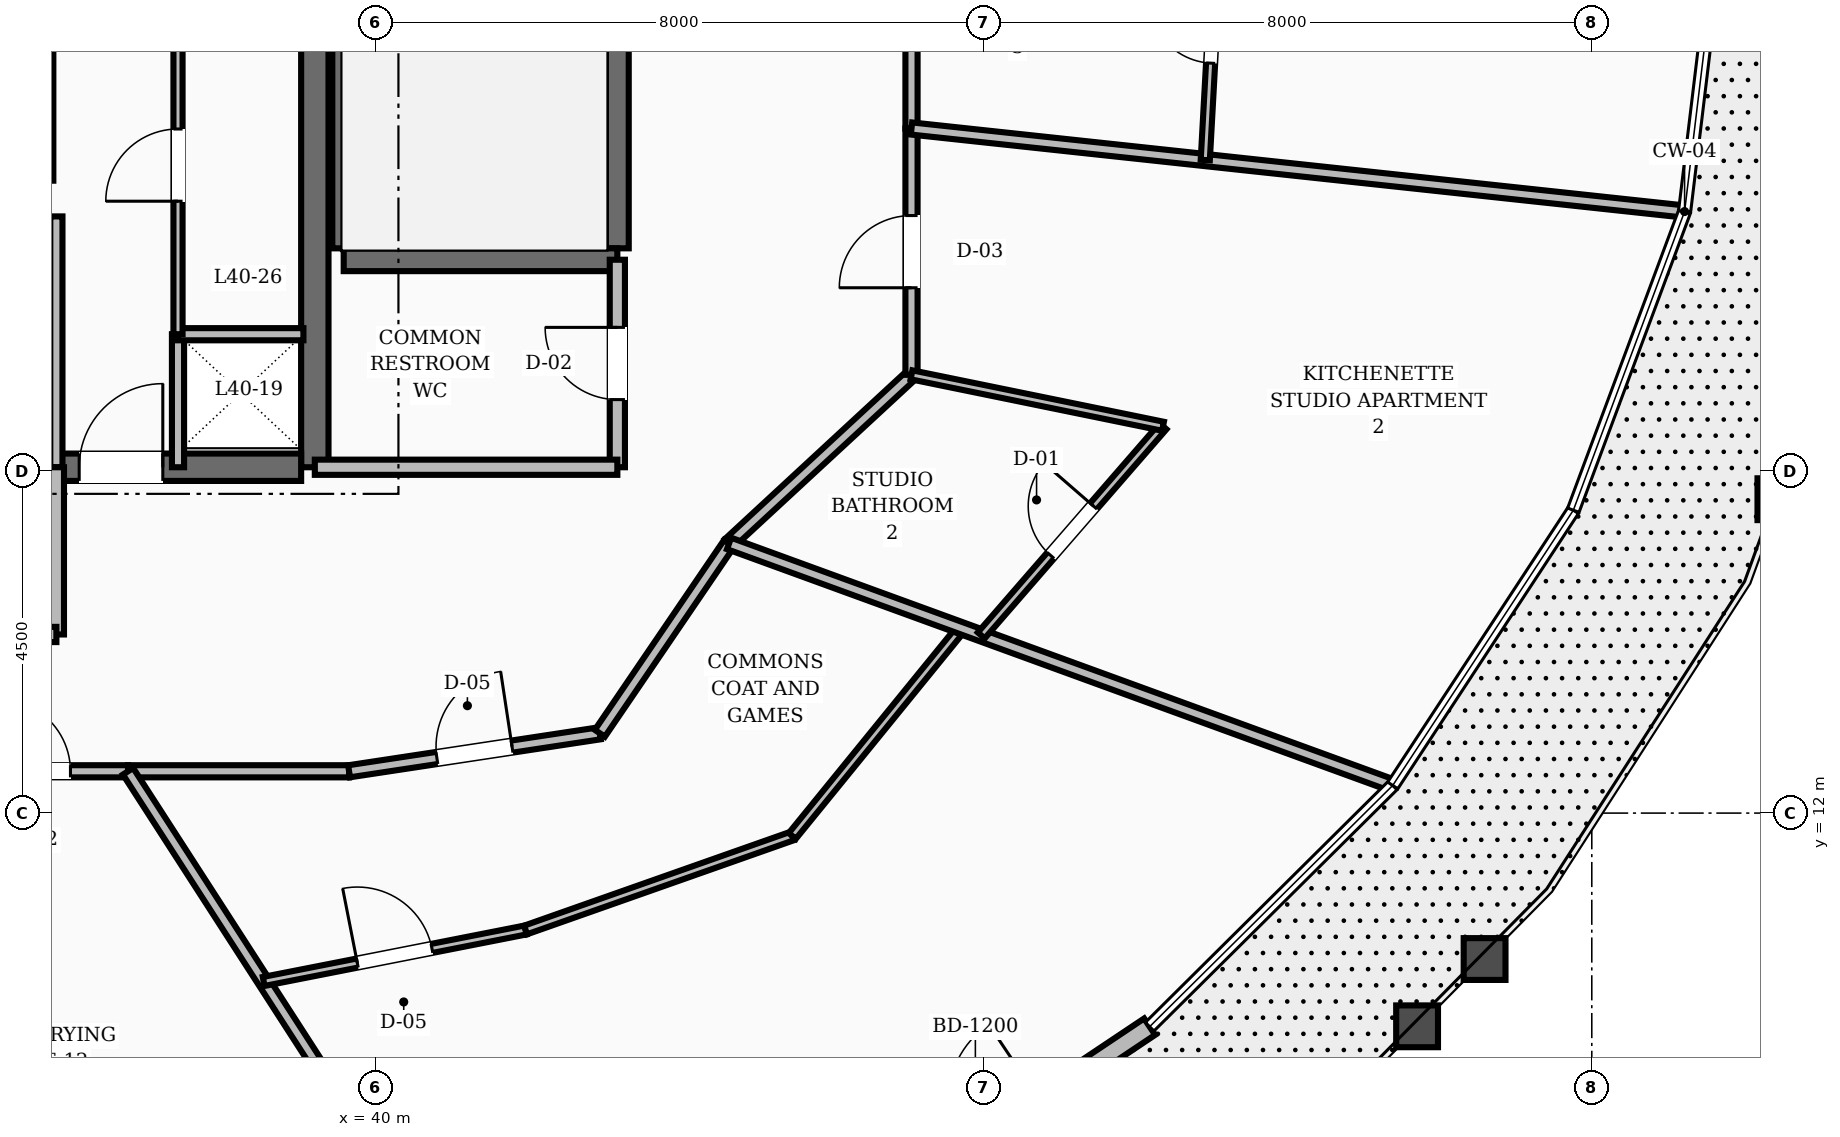
"""IFC4 building model, lengths in metres.
Left out: names, types, materials, properties, quantities, classifications, styles, units other than length and angle.
Written with IfcOpenShell. Run it as: python <this file> out.ifc"""

import sys

from ifc_helpers import new_model, si_unit, direction, frame, frame_2d, origin, place, context, subcontext, project, spatial, rectangle, extrude, element, fill, save


model = new_model("IFC4")
c1 = context("Model", 3, precision=1e-05, world=origin(), true_north=direction((0.0, 1.0)))
c2 = subcontext(c1, "Body", "Model", "MODEL_VIEW")
j1 = project(units=[si_unit("LENGTHUNIT", "METRE"), si_unit("PLANEANGLEUNIT", "RADIAN")], contexts=[c1])
p1 = place(None, origin())
s1 = spatial("IfcSite", under=j1, at=p1, CompositionType="ELEMENT")
p2 = place(p1, origin())
s2 = spatial("IfcBuilding", under=s1, at=p2, CompositionType="ELEMENT")
p3 = place(p2, frame((0.0, 0.0, 156.8)))
s3 = spatial("IfcBuildingStorey", under=s2, at=p3, CompositionType="ELEMENT", Elevation=156.8)
p4 = place(p3, frame((39.2, 16.55, 0.0), z_axis=(0.0, 0.0, 1.0), x_axis=(0.0, 1.0, 0.0)))
e1 = element("IfcWall", 1, at=p4, inside=s3, PredefinedType="SHEAR", context=c2, shape_type="SweptSolid", body=[
    extrude(rectangle(XDim=6.3, YDim=0.36, at=frame_2d((3.15, 0.0))), origin(), (0.0, 0.0, 1.0), 3.6),
])
p5 = place(p3, frame((35.8, 16.55, 0.0), z_axis=(0.0, 0.0, 1.0), x_axis=(1.0, 0.0, 0.0)))
e2 = element("IfcWall", 2, at=p5, inside=s3, PredefinedType="SHEAR", context=c2, shape_type="SweptSolid", body=[
    extrude(rectangle(XDim=3.22, YDim=0.36, at=frame_2d((1.61, 0.0))), origin(), (0.0, 0.0, 1.0), 3.6),
])
p6 = place(p5, frame((0.3, 0.0, 0.0)))
e3 = element("IfcOpeningElement", 3, at=p6, cuts=e2, PredefinedType="OPENING", context=c2, shape_type="SweptSolid", body=[
    extrude(rectangle(XDim=1.1, YDim=2.1, at=frame_2d((0.55, 1.05))), frame((0.0, 0.19, 0.0), z_axis=(0.0, -1.0, 0.0), x_axis=(1.0, 0.0, 0.0)), (0.0, 0.0, 1.0), 0.38),
])
for number, where, z_axis, x_axis in (
    (4, (43.18, 19.43, 0.0), (0.0, 0.0, 1.0), (0.0, 1.0, 0.0)),
    (5, (39.58, 19.43, 0.0), (0.0, 0.0, 1.0), (0.0, 1.0, 0.0)),
):
    element("IfcWall", number, at=place(p3, frame(where, z_axis=z_axis, x_axis=x_axis)), inside=s3, PredefinedType="SHEAR", context=c2, shape_type="SweptSolid", body=[
        extrude(rectangle(XDim=8.74, YDim=0.3, at=frame_2d((4.37, 0.0))), origin(), (0.0, 0.0, 1.0), 3.6),
    ])
p7 = place(p3, frame((39.58, 19.28, 0.0), z_axis=(0.0, 0.0, 1.0), x_axis=(1.0, 0.0, 0.0)))
e6 = element("IfcWall", 6, at=p7, inside=s3, PredefinedType="SHEAR", context=c2, shape_type="SweptSolid", body=[
    extrude(rectangle(XDim=3.6, YDim=0.3, at=frame_2d((1.8, 0.0))), origin(), (0.0, 0.0, 1.0), 3.6),
])
p8 = place(p3, frame((46.286, 6.585, 0.0), z_axis=(0.0, 0.0, 1.0), x_axis=(0.831368522851, 0.555721494286, 0.0)))
e7 = element("IfcWall", 7, at=p8, inside=s3, PredefinedType="STANDARD", context=c2, shape_type="SweptSolid", body=[
    extrude(rectangle(XDim=4.687, YDim=0.26, at=frame_2d((2.344, 0.0))), origin(), (0.0, 0.0, 1.0), 2.82),
])
p9 = place(p8, frame((1.744, 0.0, 0.0)))
e8 = element("IfcOpeningElement", 8, at=p9, cuts=e7, PredefinedType="OPENING", context=c2, shape_type="SweptSolid", body=[
    extrude(rectangle(XDim=1.2, YDim=2.15, at=frame_2d((0.6, 1.075))), frame((0.0, 0.14, 0.0), z_axis=(0.0, -1.0, 0.0), x_axis=(1.0, 0.0, 0.0)), (0.0, 0.0, 1.0), 0.28),
])
p10 = place(p3, frame((43.18, 16.55, 0.0), z_axis=(0.0, 0.0, 1.0), x_axis=(0.0, 1.0, 0.0)))
e9 = element("IfcWall", 9, at=p10, inside=s3, PredefinedType="SOLIDWALL", context=c2, shape_type="SweptSolid", body=[
    extrude(rectangle(XDim=2.73, YDim=0.2, at=frame_2d((1.365, 0.0))), origin(), (0.0, 0.0, 1.0), 2.8),
])
p11 = place(p10, frame((0.89, 0.0, 0.0)))
e10 = element("IfcOpeningElement", 10, at=p11, cuts=e9, PredefinedType="OPENING", context=c2, shape_type="SweptSolid", body=[
    extrude(rectangle(XDim=0.95, YDim=2.1, at=frame_2d((0.475, 1.05))), frame((0.0, 0.11, 0.0), z_axis=(0.0, -1.0, 0.0), x_axis=(1.0, 0.0, 0.0)), (0.0, 0.0, 1.0), 0.22),
])
p12 = place(p3, frame((39.2, 16.55, 0.0), z_axis=(0.0, 0.0, 1.0), x_axis=(1.0, 0.0, 0.0)))
e11 = element("IfcWall", 11, at=p12, inside=s3, PredefinedType="SOLIDWALL", context=c2, shape_type="SweptSolid", body=[
    extrude(rectangle(XDim=3.98, YDim=0.2, at=frame_2d((1.99, 0.0))), origin(), (0.0, 0.0, 1.0), 2.8),
])
p13 = place(p3, frame((35.8, 16.55, 0.0), z_axis=(0.0, 0.0, 1.0), x_axis=(0.0, 1.0, 0.0)))
e12 = element("IfcWall", 12, at=p13, inside=s3, PredefinedType="SOLIDWALL", context=c2, shape_type="SweptSolid", body=[
    extrude(rectangle(XDim=3.3, YDim=0.16, at=frame_2d((1.65, 0.0))), origin(), (0.0, 0.0, 1.0), 2.8),
])
p14 = place(p3, frame((37.4, 16.55, 0.0), z_axis=(0.0, 0.0, 1.0), x_axis=(0.0, 1.0, 0.0)))
e13 = element("IfcWall", 13, at=p14, inside=s3, PredefinedType="SOLIDWALL", context=c2, shape_type="SweptSolid", body=[
    extrude(rectangle(XDim=1.75, YDim=0.16, at=frame_2d((0.875, 0.0))), origin(), (0.0, 0.0, 1.0), 2.8),
])
p15 = place(p3, frame((35.8, 14.35, 0.0), z_axis=(0.0, 0.0, 1.0), x_axis=(0.0, 1.0, 0.0)))
e14 = element("IfcWall", 14, at=p15, inside=s3, PredefinedType="SOLIDWALL", context=c2, shape_type="SweptSolid", body=[
    extrude(rectangle(XDim=2.2, YDim=0.2, at=frame_2d((1.1, 0.0))), origin(), (0.0, 0.0, 1.0), 2.8),
])
p16 = place(p3, frame((28.2, 14.35, 0.0), z_axis=(0.0, 0.0, 1.0), x_axis=(1.0, 0.0, 0.0)))
e15 = element("IfcWall", 15, at=p16, inside=s3, PredefinedType="SOLIDWALL", context=c2, shape_type="SweptSolid", body=[
    extrude(rectangle(XDim=7.6, YDim=0.2, at=frame_2d((3.8, 0.0))), origin(), (0.0, 0.0, 1.0), 2.8),
])
p17 = place(p16, frame((3.2, 0.0, 0.0)))
e16 = element("IfcOpeningElement", 16, at=p17, cuts=e15, PredefinedType="OPENING", context=c2, shape_type="SweptSolid", body=[
    extrude(rectangle(XDim=1.2, YDim=2.1, at=frame_2d((0.6, 1.05))), frame((0.0, 0.11, 0.0), z_axis=(0.0, -1.0, 0.0), x_axis=(1.0, 0.0, 0.0)), (0.0, 0.0, 1.0), 0.22),
])
p18 = place(p3, frame((35.68, 20.32, 0.0), z_axis=(0.0, 0.0, 1.0), x_axis=(0.0, 1.0, 0.0)))
e17 = element("IfcWall", 17, at=p18, inside=s3, PredefinedType="SOLIDWALL", context=c2, shape_type="SweptSolid", body=[
    extrude(rectangle(XDim=2.36, YDim=0.16, at=frame_2d((1.18, 0.0))), origin(), (0.0, 0.0, 1.0), 2.8),
])
p19 = place(p3, frame((37.4, 18.3, 0.0), z_axis=(0.0, 0.0, 1.0), x_axis=(1.0, 0.0, 0.0)))
e18 = element("IfcWall", 18, at=p19, inside=s3, PredefinedType="SOLIDWALL", context=c2, shape_type="SweptSolid", body=[
    extrude(rectangle(XDim=1.65, YDim=0.16, at=frame_2d((0.825, 0.0))), origin(), (0.0, 0.0, 1.0), 2.8),
])
p20 = place(p3, frame((37.4, 18.3, 0.0), z_axis=(0.0, 0.0, 1.0), x_axis=(0.0, 1.0, 0.0)))
e19 = element("IfcWall", 19, at=p20, inside=s3, PredefinedType="PARTITIONING", context=c2, shape_type="SweptSolid", body=[
    extrude(rectangle(XDim=4.45, YDim=0.12, at=frame_2d((2.225, 0.0))), origin(), (0.0, 0.0, 1.0), 2.8),
])
p21 = place(p20, frame((1.75, 0.0, 0.0)))
e20 = element("IfcOpeningElement", 20, at=p21, cuts=e19, PredefinedType="OPENING", context=c2, shape_type="SweptSolid", body=[
    extrude(rectangle(XDim=0.95, YDim=2.1, at=frame_2d((0.475, 1.05))), frame((0.0, 0.07, 0.0), z_axis=(0.0, -1.0, 0.0), x_axis=(1.0, 0.0, 0.0)), (0.0, 0.0, 1.0), 0.14),
])
p22 = place(p3, frame((34.278, 12.55, 0.0), z_axis=(0.0, 0.0, 1.0), x_axis=(1.0, 0.0, 0.0)))
e21 = element("IfcWall", 21, at=p22, inside=s3, PredefinedType="SOLIDWALL", context=c2, shape_type="SweptSolid", body=[
    extrude(rectangle(XDim=2.465, YDim=0.16, at=frame_2d((1.232, 0.0))), origin(), (0.0, 0.0, 1.0), 2.8),
])
p23 = place(p22, frame((0.758, 0.0, 0.0)))
e22 = element("IfcOpeningElement", 22, at=p23, cuts=e21, PredefinedType="OPENING", context=c2, shape_type="SweptSolid", body=[
    extrude(rectangle(XDim=0.95, YDim=2.1, at=frame_2d((0.475, 1.05))), frame((0.0, 0.09, 0.0), z_axis=(0.0, -1.0, 0.0), x_axis=(1.0, 0.0, 0.0)), (0.0, 0.0, 1.0), 0.18),
])
p24 = place(p3, frame((36.743, 12.55, 0.0), z_axis=(0.0, 0.0, 1.0), x_axis=(1.0, 0.0, 0.0)))
e23 = element("IfcWall", 23, at=p24, inside=s3, PredefinedType="SOLIDWALL", context=c2, shape_type="SweptSolid", body=[
    extrude(rectangle(XDim=2.908, YDim=0.16, at=frame_2d((1.454, 0.0))), origin(), (0.0, 0.0, 1.0), 2.8),
])
p25 = place(p3, frame((39.651, 12.55, 0.0), z_axis=(0.0, 0.0, 1.0), x_axis=(0.988710906508, 0.149835721217, 0.0)))
e24 = element("IfcWall", 24, at=p25, inside=s3, PredefinedType="SOLIDWALL", context=c2, shape_type="SweptSolid", body=[
    extrude(rectangle(XDim=3.337, YDim=0.16, at=frame_2d((1.668, 0.0))), origin(), (0.0, 0.0, 1.0), 2.8),
])
p26 = place(p25, frame((1.168, 0.0, 0.0)))
e25 = element("IfcOpeningElement", 25, at=p26, cuts=e24, PredefinedType="OPENING", context=c2, shape_type="SweptSolid", body=[
    extrude(rectangle(XDim=1.0, YDim=2.1, at=frame_2d((0.5, 1.05))), frame((0.0, 0.09, 0.0), z_axis=(0.0, -1.0, 0.0), x_axis=(1.0, 0.0, 0.0)), (0.0, 0.0, 1.0), 0.18),
])
p27 = place(p3, frame((42.95, 13.05, 0.0), z_axis=(0.0, 0.0, 1.0), x_axis=(0.562674669208, 0.826678423955, 0.0)))
e26 = element("IfcWall", 26, at=p27, inside=s3, PredefinedType="SOLIDWALL", context=c2, shape_type="SweptSolid", body=[
    extrude(rectangle(XDim=3.021, YDim=0.16, at=frame_2d((1.511, 0.0))), origin(), (0.0, 0.0, 1.0), 2.8),
])
p28 = place(p3, frame((44.65, 15.548, 0.0), z_axis=(0.0, 0.0, 1.0), x_axis=(0.734347936521, 0.678773237633, 0.0)))
e27 = element("IfcWall", 27, at=p28, inside=s3, PredefinedType="SOLIDWALL", context=c2, shape_type="SweptSolid", body=[
    extrude(rectangle(XDim=3.268, YDim=0.16, at=frame_2d((1.634, 0.0))), origin(), (0.0, 0.0, 1.0), 2.8),
])
p29 = place(p3, frame((47.05, 17.766, 0.0), z_axis=(0.0, 0.0, 1.0), x_axis=(0.0, 1.0, 0.0)))
e28 = element("IfcWall", 28, at=p29, inside=s3, PredefinedType="SOLIDWALL", context=c2, shape_type="SweptSolid", body=[
    extrude(rectangle(XDim=3.24, YDim=0.16, at=frame_2d((1.62, 0.0))), origin(), (0.0, 0.0, 1.0), 2.8),
])
p30 = place(p29, frame((1.145, 0.0, 0.0)))
e29 = element("IfcOpeningElement", 29, at=p30, cuts=e28, PredefinedType="OPENING", context=c2, shape_type="SweptSolid", body=[
    extrude(rectangle(XDim=0.95, YDim=2.1, at=frame_2d((0.475, 1.05))), frame((0.0, 0.09, 0.0), z_axis=(0.0, -1.0, 0.0), x_axis=(1.0, 0.0, 0.0)), (0.0, 0.0, 1.0), 0.18),
])
p31 = place(p3, frame((47.05, 21.006, 0.0), z_axis=(0.0, 0.0, 1.0), x_axis=(0.0, 1.0, 0.0)))
e30 = element("IfcWall", 30, at=p31, inside=s3, PredefinedType="SOLIDWALL", context=c2, shape_type="SweptSolid", body=[
    extrude(rectangle(XDim=2.994, YDim=0.16, at=frame_2d((1.497, 0.0))), origin(), (0.0, 0.0, 1.0), 2.8),
])
p32 = place(p3, frame((36.743, 12.55, 0.0), z_axis=(0.0, 0.0, 1.0), x_axis=(0.542222596655, -0.840234881254, 0.0)))
e31 = element("IfcWall", 31, at=p32, inside=s3, PredefinedType="SOLIDWALL", context=c2, shape_type="SweptSolid", body=[
    extrude(rectangle(XDim=9.352, YDim=0.16, at=frame_2d((4.676, 0.0))), origin(), (0.0, 0.0, 1.0), 2.8),
])
p33 = place(p3, frame((38.527, 9.785, 0.0), z_axis=(0.0, 0.0, 1.0), x_axis=(0.981217112096, 0.192906658595, 0.0)))
e32 = element("IfcWall", 32, at=p33, inside=s3, PredefinedType="PARTITIONING", context=c2, shape_type="SweptSolid", body=[
    extrude(rectangle(XDim=3.512, YDim=0.12, at=frame_2d((1.756, 0.0))), origin(), (0.0, 0.0, 1.0), 2.8),
])
p34 = place(p33, frame((1.256, 0.0, 0.0)))
e33 = element("IfcOpeningElement", 33, at=p34, cuts=e32, PredefinedType="OPENING", context=c2, shape_type="SweptSolid", body=[
    extrude(rectangle(XDim=1.0, YDim=2.1, at=frame_2d((0.5, 1.05))), frame((0.0, 0.07, 0.0), z_axis=(0.0, -1.0, 0.0), x_axis=(1.0, 0.0, 0.0)), (0.0, 0.0, 1.0), 0.14),
])
p35 = place(p3, frame((41.973, 10.462, 0.0), z_axis=(0.0, 0.0, 1.0), x_axis=(0.943136844467, 0.332404712075, 0.0)))
e34 = element("IfcWall", 34, at=p35, inside=s3, PredefinedType="PARTITIONING", context=c2, shape_type="SweptSolid", body=[
    extrude(rectangle(XDim=3.72, YDim=0.12, at=frame_2d((1.86, 0.0))), origin(), (0.0, 0.0, 1.0), 2.8),
])
p36 = place(p3, frame((45.482, 11.699, 0.0), z_axis=(0.0, 0.0, 1.0), x_axis=(0.631043665678, 0.775747311957, 0.0)))
e35 = element("IfcWall", 35, at=p36, inside=s3, PredefinedType="PARTITIONING", context=c2, shape_type="SweptSolid", body=[
    extrude(rectangle(XDim=3.524, YDim=0.12, at=frame_2d((1.762, 0.0))), origin(), (0.0, 0.0, 1.0), 2.8),
])
p37 = place(p3, frame((44.65, 15.548, 0.0), z_axis=(0.0, 0.0, 1.0), x_axis=(0.939495403678, -0.342561507568, 0.0)))
e36 = element("IfcWall", 36, at=p37, inside=s3, PredefinedType="SOLIDWALL", context=c2, shape_type="SweptSolid", body=[
    extrude(rectangle(XDim=9.244, YDim=0.16, at=frame_2d((4.622, 0.0))), origin(), (0.0, 0.0, 1.0), 2.8),
])
p38 = place(p3, frame((47.968, 14.338, 0.0), z_axis=(0.0, 0.0, 1.0), x_axis=(0.655911700686, 0.754837625522, 0.0)))
e37 = element("IfcWall", 37, at=p38, inside=s3, PredefinedType="PARTITIONING", context=c2, shape_type="SweptSolid", body=[
    extrude(rectangle(XDim=3.645, YDim=0.12, at=frame_2d((1.823, 0.0))), origin(), (0.0, 0.0, 1.0), 2.8),
])
p39 = place(p38, frame((1.393, 0.0, 0.0)))
e38 = element("IfcOpeningElement", 38, at=p39, cuts=e37, PredefinedType="OPENING", context=c2, shape_type="SweptSolid", body=[
    extrude(rectangle(XDim=0.86, YDim=2.1, at=frame_2d((0.43, 1.05))), frame((0.0, 0.07, 0.0), z_axis=(0.0, -1.0, 0.0), x_axis=(1.0, 0.0, 0.0)), (0.0, 0.0, 1.0), 0.14),
])
p40 = place(p3, frame((47.05, 17.766, 0.0), z_axis=(0.0, 0.0, 1.0), x_axis=(0.979703641508, -0.200451427573, 0.0)))
e39 = element("IfcWall", 39, at=p40, inside=s3, PredefinedType="PARTITIONING", context=c2, shape_type="SweptSolid", body=[
    extrude(rectangle(XDim=3.377, YDim=0.12, at=frame_2d((1.689, 0.0))), origin(), (0.0, 0.0, 1.0), 2.8),
])
p41 = place(p3, frame((47.05, 21.006, 0.0), z_axis=(0.0, 0.0, 1.0), x_axis=(0.994280445997, -0.106800724287, 0.0)))
e40 = element("IfcWall", 40, at=p41, inside=s3, PredefinedType="SOLIDWALL", context=c2, shape_type="SweptSolid", body=[
    extrude(rectangle(XDim=10.179, YDim=0.16, at=frame_2d((5.09, 0.0))), origin(), (0.0, 0.0, 1.0), 2.8),
])
p42 = place(p3, frame((50.915, 20.591, 0.0), z_axis=(0.0, 0.0, 1.0), x_axis=(0.055066014274, 0.998482715961, 0.0)))
e41 = element("IfcWall", 41, at=p42, inside=s3, PredefinedType="PARTITIONING", context=c2, shape_type="SweptSolid", body=[
    extrude(rectangle(XDim=3.414, YDim=0.12, at=frame_2d((1.707, 0.0))), origin(), (0.0, 0.0, 1.0), 2.8),
])
p43 = place(p42, frame((1.277, 0.0, 0.0)))
e42 = element("IfcOpeningElement", 42, at=p43, cuts=e41, PredefinedType="OPENING", context=c2, shape_type="SweptSolid", body=[
    extrude(rectangle(XDim=0.86, YDim=2.1, at=frame_2d((0.43, 1.05))), frame((0.0, 0.07, 0.0), z_axis=(0.0, -1.0, 0.0), x_axis=(1.0, 0.0, 0.0)), (0.0, 0.0, 1.0), 0.14),
])
p44 = place(p11, origin())
e43 = element("IfcDoor", 43, at=p44, inside=s3, OperationType="SINGLE_SWING_RIGHT", PredefinedType="DOOR", context=c2, shape_type="SweptSolid", body=[
    extrude(rectangle(XDim=0.95, YDim=2.1, at=frame_2d((0.475, 1.05))), frame((0.0, 0.025, 0.0), z_axis=(0.0, -1.0, 0.0), x_axis=(1.0, 0.0, 0.0)), (0.0, 0.0, 1.0), 0.05),
])
fill(e10, e43)
p45 = place(p6, origin())
e44 = element("IfcDoor", 44, at=p45, inside=s3, OperationType="SINGLE_SWING_RIGHT", PredefinedType="DOOR", context=c2, shape_type="SweptSolid", body=[
    extrude(rectangle(XDim=1.1, YDim=2.1, at=frame_2d((0.55, 1.05))), frame((0.0, 0.025, 0.0), z_axis=(0.0, -1.0, 0.0), x_axis=(1.0, 0.0, 0.0)), (0.0, 0.0, 1.0), 0.05),
])
fill(e3, e44)
p46 = place(p21, origin())
e45 = element("IfcDoor", 45, at=p46, inside=s3, OperationType="SINGLE_SWING_LEFT", PredefinedType="DOOR", context=c2, shape_type="SweptSolid", body=[
    extrude(rectangle(XDim=0.95, YDim=2.1, at=frame_2d((0.475, 1.05))), frame((0.0, 0.025, 0.0), z_axis=(0.0, -1.0, 0.0), x_axis=(1.0, 0.0, 0.0)), (0.0, 0.0, 1.0), 0.05),
])
fill(e20, e45)
p47 = place(p26, origin())
e46 = element("IfcDoor", 46, at=p47, inside=s3, OperationType="SINGLE_SWING_RIGHT", PredefinedType="DOOR", context=c2, shape_type="SweptSolid", body=[
    extrude(rectangle(XDim=1.0, YDim=2.1, at=frame_2d((0.5, 1.05))), frame((0.0, 0.025, 0.0), z_axis=(0.0, -1.0, 0.0), x_axis=(1.0, 0.0, 0.0)), (0.0, 0.0, 1.0), 0.05),
])
fill(e25, e46)
p48 = place(p34, origin())
e47 = element("IfcDoor", 47, at=p48, inside=s3, OperationType="SINGLE_SWING_LEFT", PredefinedType="DOOR", context=c2, shape_type="SweptSolid", body=[
    extrude(rectangle(XDim=1.0, YDim=2.1, at=frame_2d((0.5, 1.05))), frame((0.0, 0.025, 0.0), z_axis=(0.0, -1.0, 0.0), x_axis=(1.0, 0.0, 0.0)), (0.0, 0.0, 1.0), 0.05),
])
fill(e33, e47)
p49 = place(p39, origin())
e48 = element("IfcDoor", 48, at=p49, inside=s3, OperationType="SINGLE_SWING_RIGHT", PredefinedType="DOOR", context=c2, shape_type="SweptSolid", body=[
    extrude(rectangle(XDim=0.86, YDim=2.1, at=frame_2d((0.43, 1.05))), frame((0.0, 0.025, 0.0), z_axis=(0.0, -1.0, 0.0), x_axis=(1.0, 0.0, 0.0)), (0.0, 0.0, 1.0), 0.05),
])
fill(e38, e48)
p50 = place(p30, origin())
e49 = element("IfcDoor", 49, at=p50, inside=s3, OperationType="SINGLE_SWING_LEFT", PredefinedType="DOOR", context=c2, shape_type="SweptSolid", body=[
    extrude(rectangle(XDim=0.95, YDim=2.1, at=frame_2d((0.475, 1.05))), frame((0.0, 0.025, 0.0), z_axis=(0.0, -1.0, 0.0), x_axis=(1.0, 0.0, 0.0)), (0.0, 0.0, 1.0), 0.05),
])
fill(e29, e49)
p51 = place(p43, origin())
e50 = element("IfcDoor", 50, at=p51, inside=s3, OperationType="SINGLE_SWING_RIGHT", PredefinedType="DOOR", context=c2, shape_type="SweptSolid", body=[
    extrude(rectangle(XDim=0.86, YDim=2.1, at=frame_2d((0.43, 1.05))), frame((0.0, 0.025, 0.0), z_axis=(0.0, -1.0, 0.0), x_axis=(1.0, 0.0, 0.0)), (0.0, 0.0, 1.0), 0.05),
])
fill(e42, e50)
p52 = place(p23, origin())
e51 = element("IfcDoor", 51, at=p52, inside=s3, OperationType="SINGLE_SWING_LEFT", PredefinedType="DOOR", context=c2, shape_type="SweptSolid", body=[
    extrude(rectangle(XDim=0.95, YDim=2.1, at=frame_2d((0.475, 1.05))), frame((0.0, 0.025, 0.0), z_axis=(0.0, -1.0, 0.0), x_axis=(1.0, 0.0, 0.0)), (0.0, 0.0, 1.0), 0.05),
])
fill(e22, e51)
save(model, sys.argv[1])
